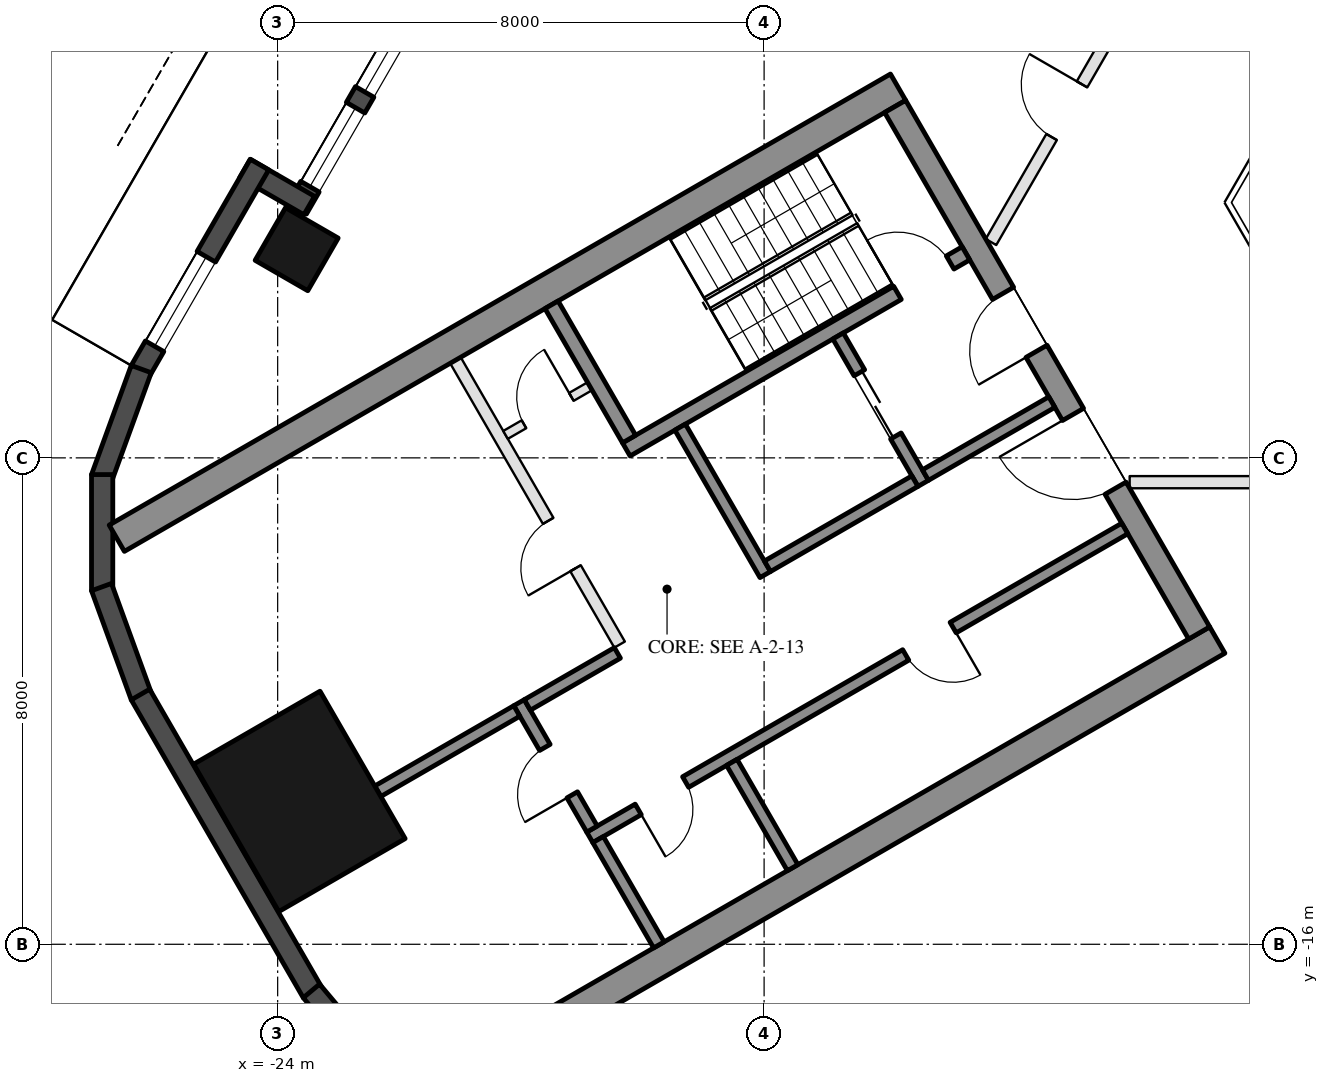
"""IFC4 building model, lengths in metres.
Left out: names, types, materials, properties, quantities, classifications, styles, units other than length and angle.
Written with IfcOpenShell. Run it as: python <this file> out.ifc"""

import sys

from ifc_helpers import new_model, si_unit, direction, frame, frame_2d, origin, origin_2d, place, context, subcontext, project, spatial, rectangle, hollow_rectangle, extrude, element, fill, save


model = new_model("IFC4")
c1 = context("Model", 3, precision=1e-05, world=origin(), true_north=direction((0.0, 1.0)))
c2 = subcontext(c1, "Body", "Model", "MODEL_VIEW")
j1 = project(units=[si_unit("LENGTHUNIT", "METRE"), si_unit("PLANEANGLEUNIT", "RADIAN")], contexts=[c1])
p1 = place(None, origin())
s1 = spatial("IfcSite", under=j1, at=p1, CompositionType="ELEMENT")
p2 = place(p1, origin())
s2 = spatial("IfcBuilding", under=s1, at=p2, CompositionType="ELEMENT")
p3 = place(p2, frame((0.0, 0.0, 65.0)))
s3 = spatial("IfcBuildingStorey", under=s2, at=p3, CompositionType="ELEMENT", Elevation=65.0)
p4 = place(p3, frame((-23.688, -4.568, 0.0), z_axis=(0.0, 0.0, 1.0), x_axis=(0.5, 0.866025403784, 0.0)))
e1 = element("IfcColumn", 1, at=p4, inside=s3, PredefinedType="COLUMN", context=c2, shape_type="SweptSolid", body=[
    extrude(hollow_rectangle(XDim=1.0, YDim=1.0, WallThickness=0.045, at=origin_2d()), origin(), (0.0, 0.0, 1.0), 3.7),
])
p5 = place(p3, frame((-23.643, -13.65, 0.0), z_axis=(0.0, 0.0, 1.0), x_axis=(-0.5, 0.866025403784, 0.0)))
e2 = element("IfcColumn", 2, at=p5, inside=s3, PredefinedType="COLUMN", context=c2, shape_type="SweptSolid", body=[
    extrude(hollow_rectangle(XDim=2.8, YDim=2.4, WallThickness=0.07, at=origin_2d()), origin(), (0.0, 0.0, 1.0), 3.7),
])
p6 = place(p3, frame((-20.309, 1.934, 0.0), z_axis=(0.0, 0.0, 1.0), x_axis=(-0.499992114976, -0.866029956157, 0.0)))
e3 = element("IfcWall", 3, at=p6, inside=s3, PredefinedType="SOLIDWALL", context=c2, shape_type="SweptSolid", body=[
    extrude(rectangle(XDim=6.74, YDim=0.35, at=frame_2d((3.37, 0.0))), origin(), (0.0, 0.0, 1.0), 3.55),
])
p7 = place(p6, frame((0.32, 0.0, 0.0)))
e4 = element("IfcOpeningElement", 4, at=p7, cuts=e3, PredefinedType="OPENING", context=c2, shape_type="SweptSolid", body=[
    extrude(rectangle(XDim=2.4, YDim=2.4, at=frame_2d((1.2, 1.2))), frame((0.0, 0.185, 0.0), z_axis=(0.0, -1.0, 0.0), x_axis=(1.0, 0.0, 0.0)), (0.0, 0.0, 1.0), 0.37),
])
p8 = place(p6, frame((3.02, 0.0, 0.3)))
e5 = element("IfcOpeningElement", 5, at=p8, cuts=e3, PredefinedType="OPENING", context=c2, shape_type="SweptSolid", body=[
    extrude(rectangle(XDim=1.5, YDim=2.65, at=frame_2d((0.75, 1.325))), frame((0.0, 0.185, 0.0), z_axis=(0.0, -1.0, 0.0), x_axis=(1.0, 0.0, 0.0)), (0.0, 0.0, 1.0), 0.37),
])
p9 = place(p6, frame((4.82, 0.0, 0.3)))
e6 = element("IfcOpeningElement", 6, at=p9, cuts=e3, PredefinedType="OPENING", context=c2, shape_type="SweptSolid", body=[
    extrude(rectangle(XDim=1.5, YDim=2.65, at=frame_2d((0.75, 1.325))), frame((0.0, 0.185, 0.0), z_axis=(0.0, -1.0, 0.0), x_axis=(1.0, 0.0, 0.0)), (0.0, 0.0, 1.0), 0.37),
])
p10 = place(p3, frame((-23.481, -3.85, 0.0), z_axis=(0.0, 0.0, 1.0), x_axis=(-0.866092288191, 0.499884134912, 0.0)))
e7 = element("IfcWall", 7, at=p10, inside=s3, PredefinedType="SOLIDWALL", context=c2, shape_type="SweptSolid", body=[
    extrude(rectangle(XDim=1.22, YDim=0.35, at=frame_2d((0.61, 0.0))), origin(), (0.0, 0.0, 1.0), 3.55),
])
p11 = place(p3, frame((-24.299, -3.176, 0.0), z_axis=(0.0, 0.0, 1.0), x_axis=(-0.500028278809, -0.866009076391, 0.0)))
e8 = element("IfcWall", 8, at=p11, inside=s3, PredefinedType="SOLIDWALL", context=c2, shape_type="SweptSolid", body=[
    extrude(rectangle(XDim=3.916, YDim=0.35, at=frame_2d((1.958, 0.0))), origin(), (0.0, 0.0, 1.0), 3.55),
])
p12 = place(p11, frame((1.75, 0.0, 0.3)))
e9 = element("IfcOpeningElement", 9, at=p12, cuts=e8, PredefinedType="OPENING", context=c2, shape_type="SweptSolid", body=[
    extrude(rectangle(XDim=1.7, YDim=2.65, at=frame_2d((0.85, 1.325))), frame((0.0, 0.185, 0.0), z_axis=(0.0, -1.0, 0.0), x_axis=(1.0, 0.0, 0.0)), (0.0, 0.0, 1.0), 0.37),
])
for number, where, z_axis, x_axis in (
    (10, (-26.244, -6.54, 0.0), (0.0, 0.0, 1.0), (-0.342, -0.94, 0.0)),
    (11, (-26.886, -8.275, 0.0), (0.0, 0.0, 1.0), (0.0, -1.0, 0.0)),
    (12, (-26.897, -10.125, 0.0), (0.0, 0.0, 1.0), (0.342, -0.94, 0.0)),
):
    element("IfcWall", number, at=place(p3, frame(where, z_axis=z_axis, x_axis=x_axis)), inside=s3, PredefinedType="SOLIDWALL", context=c2, shape_type="SweptSolid", body=[
        extrude(rectangle(XDim=1.91, YDim=0.35, at=frame_2d((0.955, 0.0))), origin(), (0.0, 0.0, 1.0), 3.55),
    ])
p13 = place(p3, frame((-26.257, -11.893, 0.0), z_axis=(0.0, 0.0, 1.0), x_axis=(0.500018773155, -0.866014564827, 0.0)))
e13 = element("IfcWall", 13, at=p13, inside=s3, PredefinedType="SOLIDWALL", context=c2, shape_type="SweptSolid", body=[
    extrude(rectangle(XDim=5.658, YDim=0.35, at=frame_2d((2.829, 0.0))), origin(), (0.0, 0.0, 1.0), 3.55),
])
p14 = place(p3, frame((-23.445, -16.768, 0.0), z_axis=(0.0, 0.0, 1.0), x_axis=(0.642733291068, -0.76609001857, 0.0)))
e14 = element("IfcWall", 14, at=p14, inside=s3, PredefinedType="SOLIDWALL", context=c2, shape_type="SweptSolid", body=[
    extrude(rectangle(XDim=1.91, YDim=0.35, at=frame_2d((0.955, 0.0))), origin(), (0.0, 0.0, 1.0), 3.55),
])
for number, where, z_axis, x_axis in (
    (15, (-13.797, -1.903, 0.0), (0.0, 0.0, 1.0), (-0.866, -0.5, 0.0)),
    (16, (-8.547, -10.997, 0.0), (0.0, 0.0, 1.0), (-0.866, -0.5, 0.0)),
):
    element("IfcWall", number, at=place(p3, frame(where, z_axis=z_axis, x_axis=x_axis)), inside=s3, PredefinedType="SHEAR", context=c2, shape_type="SweptSolid", body=[
        extrude(rectangle(XDim=14.837, YDim=0.5, at=frame_2d((7.418, 0.0))), origin(), (0.0, 0.0, 1.0), 3.5),
    ])
p15 = place(p3, frame((-13.845, -2.22, 0.0), z_axis=(0.0, 0.0, 1.0), x_axis=(0.500004234368, -0.866022959057, 0.0)))
e17 = element("IfcWall", 17, at=p15, inside=s3, PredefinedType="SHEAR", context=c2, shape_type="SweptSolid", body=[
    extrude(rectangle(XDim=10.0, YDim=0.4, at=frame_2d((5.0, 0.0))), origin(), (0.0, 0.0, 1.0), 3.5),
])
p16 = place(p15, frame((3.55, 0.0, 0.0)))
e18 = element("IfcOpeningElement", 18, at=p16, cuts=e17, PredefinedType="OPENING", context=c2, shape_type="SweptSolid", body=[
    extrude(rectangle(XDim=1.1, YDim=2.1, at=frame_2d((0.55, 1.05))), frame((0.0, 0.21, 0.0), z_axis=(0.0, -1.0, 0.0), x_axis=(1.0, 0.0, 0.0)), (0.0, 0.0, 1.0), 0.42),
])
p17 = place(p15, frame((5.85, 0.0, 0.0)))
e19 = element("IfcOpeningElement", 19, at=p17, cuts=e17, PredefinedType="OPENING", context=c2, shape_type="SweptSolid", body=[
    extrude(rectangle(XDim=1.4, YDim=2.1, at=frame_2d((0.7, 1.05))), frame((0.0, 0.21, 0.0), z_axis=(0.0, -1.0, 0.0), x_axis=(1.0, 0.0, 0.0)), (0.0, 0.0, 1.0), 0.42),
])
p18 = place(p3, frame((-12.681, -4.636, 0.0), z_axis=(0.0, 0.0, 1.0), x_axis=(-0.866021702275, -0.500006411147, 0.0)))
e20 = element("IfcWall", 20, at=p18, inside=s3, PredefinedType="SHEAR", context=c2, shape_type="SweptSolid", body=[
    extrude(rectangle(XDim=6.45, YDim=0.25, at=frame_2d((3.225, 0.0))), origin(), (0.0, 0.0, 1.0), 3.5),
])
p19 = place(p18, frame((0.3, 0.0, 0.0)))
e21 = element("IfcOpeningElement", 21, at=p19, cuts=e20, PredefinedType="OPENING", context=c2, shape_type="SweptSolid", body=[
    extrude(rectangle(XDim=1.0, YDim=2.1, at=frame_2d((0.5, 1.05))), frame((0.0, 0.135, 0.0), z_axis=(0.0, -1.0, 0.0), x_axis=(1.0, 0.0, 0.0)), (0.0, 0.0, 1.0), 0.27),
])
p20 = place(p3, frame((-19.496, -5.482, 0.0), z_axis=(0.0, 0.0, 1.0), x_axis=(0.499990435942, -0.866030925526, 0.0)))
e22 = element("IfcWall", 22, at=p20, inside=s3, PredefinedType="SHEAR", context=c2, shape_type="SweptSolid", body=[
    extrude(rectangle(XDim=2.55, YDim=0.25, at=frame_2d((1.275, 0.0))), origin(), (0.0, 0.0, 1.0), 3.5),
])
p21 = place(p3, frame((-17.381, -7.495, 0.0), z_axis=(0.0, 0.0, 1.0), x_axis=(0.500011755427, -0.866018616679, 0.0)))
e23 = element("IfcWall", 23, at=p21, inside=s3, PredefinedType="SHEAR", context=c2, shape_type="SweptSolid", body=[
    extrude(rectangle(XDim=2.8, YDim=0.2, at=frame_2d((1.4, 0.0))), origin(), (0.0, 0.0, 1.0), 3.5),
])
p22 = place(p3, frame((-14.783, -5.995, 0.0), z_axis=(0.0, 0.0, 1.0), x_axis=(0.49994636267, -0.866056369097, 0.0)))
e24 = element("IfcWall", 24, at=p22, inside=s3, PredefinedType="SHEAR", context=c2, shape_type="SweptSolid", body=[
    extrude(rectangle(XDim=2.8, YDim=0.2, at=frame_2d((1.4, 0.0))), origin(), (0.0, 0.0, 1.0), 3.5),
])
p23 = place(p22, frame((0.7, 0.0, 0.0)))
e25 = element("IfcOpeningElement", 25, at=p23, cuts=e24, PredefinedType="OPENING", context=c2, shape_type="SweptSolid", body=[
    extrude(rectangle(XDim=1.2, YDim=2.1, at=frame_2d((0.6, 1.05))), frame((0.0, 0.11, 0.0), z_axis=(0.0, -1.0, 0.0), x_axis=(1.0, 0.0, 0.0)), (0.0, 0.0, 1.0), 0.22),
])
p24 = place(p3, frame((-13.52, -8.383, 0.0), z_axis=(0.0, 0.0, 1.0), x_axis=(-0.866034573852, -0.49998411664, 0.0)))
e26 = element("IfcWall", 26, at=p24, inside=s3, PredefinedType="SHEAR", context=c2, shape_type="SweptSolid", body=[
    extrude(rectangle(XDim=2.8, YDim=0.2, at=frame_2d((1.4, 0.0))), origin(), (0.0, 0.0, 1.0), 3.5),
])
p25 = place(p3, frame((-11.268, -7.083, 0.0), z_axis=(0.0, 0.0, 1.0), x_axis=(-0.866050077142, -0.499957262057, 0.0)))
e27 = element("IfcWall", 27, at=p25, inside=s3, PredefinedType="SHEAR", context=c2, shape_type="SweptSolid", body=[
    extrude(rectangle(XDim=2.4, YDim=0.2, at=frame_2d((1.2, 0.0))), origin(), (0.0, 0.0, 1.0), 3.5),
])
p26 = place(p3, frame((-10.068, -9.162, 0.0), z_axis=(0.0, 0.0, 1.0), x_axis=(-0.866032725843, -0.499987317609, 0.0)))
e28 = element("IfcWall", 28, at=p26, inside=s3, PredefinedType="SHEAR", context=c2, shape_type="SweptSolid", body=[
    extrude(rectangle(XDim=10.16, YDim=0.2, at=frame_2d((5.08, 0.0))), origin(), (0.0, 0.0, 1.0), 3.5),
])
p27 = place(p26, frame((3.26, 0.0, 0.0)))
e29 = element("IfcOpeningElement", 29, at=p27, cuts=e28, PredefinedType="OPENING", context=c2, shape_type="SweptSolid", body=[
    extrude(rectangle(XDim=0.9, YDim=2.1, at=frame_2d((0.45, 1.05))), frame((0.0, 0.11, 0.0), z_axis=(0.0, -1.0, 0.0), x_axis=(1.0, 0.0, 0.0)), (0.0, 0.0, 1.0), 0.22),
])
p28 = place(p26, frame((8.34, 0.0, 0.0)))
e30 = element("IfcOpeningElement", 30, at=p28, cuts=e28, PredefinedType="OPENING", context=c2, shape_type="SweptSolid", body=[
    extrude(rectangle(XDim=0.9, YDim=2.1, at=frame_2d((0.45, 1.05))), frame((0.0, 0.11, 0.0), z_axis=(0.0, -1.0, 0.0), x_axis=(1.0, 0.0, 0.0)), (0.0, 0.0, 1.0), 0.22),
])
p29 = place(p3, frame((-20.031, -12.026, 0.0), z_axis=(0.0, 0.0, 1.0), x_axis=(0.500033551112, -0.866006032174, 0.0)))
e31 = element("IfcWall", 31, at=p29, inside=s3, PredefinedType="SHEAR", context=c2, shape_type="SweptSolid", body=[
    extrude(rectangle(XDim=2.4, YDim=0.2, at=frame_2d((1.2, 0.0))), origin(), (0.0, 0.0, 1.0), 3.5),
])
p30 = place(p29, frame((0.85, 0.0, 0.0)))
e32 = element("IfcOpeningElement", 32, at=p30, cuts=e31, PredefinedType="OPENING", context=c2, shape_type="SweptSolid", body=[
    extrude(rectangle(XDim=0.9, YDim=2.1, at=frame_2d((0.45, 1.05))), frame((0.0, 0.11, 0.0), z_axis=(0.0, -1.0, 0.0), x_axis=(1.0, 0.0, 0.0)), (0.0, 0.0, 1.0), 0.22),
])
p31 = place(p3, frame((-18.413, -11.208, 0.0), z_axis=(0.0, 0.0, 1.0), x_axis=(-0.866038183914, -0.499977863513, 0.0)))
e33 = element("IfcWall", 33, at=p31, inside=s3, PredefinedType="SHEAR", context=c2, shape_type="SweptSolid", body=[
    extrude(rectangle(XDim=1.71, YDim=0.2, at=frame_2d((0.855, 0.0))), origin(), (0.0, 0.0, 1.0), 3.5),
])
for number, where, z_axis, x_axis in (
    (34, (-16.531, -13.008, 0.0), (0.0, 0.0, 1.0), (0.5, -0.866, 0.0)),
    (35, (-18.73, -14.278, 0.0), (0.0, 0.0, 1.0), (0.5, -0.866, 0.0)),
):
    element("IfcWall", number, at=place(p3, frame(where, z_axis=z_axis, x_axis=x_axis)), inside=s3, PredefinedType="SHEAR", context=c2, shape_type="SweptSolid", body=[
        extrude(rectangle(XDim=2.0, YDim=0.2, at=frame_2d((1.0, 0.0))), origin(), (0.0, 0.0, 1.0), 3.5),
    ])
p32 = place(p3, frame((-20.067, -12.163, 0.0), z_axis=(0.0, 0.0, 1.0), x_axis=(-0.866060851709, -0.499938597367, 0.0)))
e36 = element("IfcWall", 36, at=p32, inside=s3, PredefinedType="SHEAR", context=c2, shape_type="SweptSolid", body=[
    extrude(rectangle(XDim=2.64, YDim=0.2, at=frame_2d((1.32, 0.0))), origin(), (0.0, 0.0, 1.0), 3.5),
])
p33 = place(p3, frame((-21.076, -6.395, 0.0), z_axis=(0.0, 0.0, 1.0), x_axis=(0.50001468107, -0.866016927499, 0.0)))
e37 = element("IfcWall", 37, at=p33, inside=s3, PredefinedType="PARTITIONING", context=c2, shape_type="SweptSolid", body=[
    extrude(rectangle(XDim=5.4, YDim=0.2, at=frame_2d((2.7, 0.0))), origin(), (0.0, 0.0, 1.0), 3.5),
])
p34 = place(p33, frame((3.05, 0.0, 0.0)))
e38 = element("IfcOpeningElement", 38, at=p34, cuts=e37, PredefinedType="OPENING", context=c2, shape_type="SweptSolid", body=[
    extrude(rectangle(XDim=0.9, YDim=2.1, at=frame_2d((0.45, 1.05))), frame((0.0, 0.11, 0.0), z_axis=(0.0, -1.0, 0.0), x_axis=(1.0, 0.0, 0.0)), (0.0, 0.0, 1.0), 0.22),
])
p35 = place(p3, frame((-18.866, -6.822, 0.0), z_axis=(0.0, 0.0, 1.0), x_axis=(-0.866028054938, -0.499995408039, 0.0)))
e39 = element("IfcWall", 39, at=p35, inside=s3, PredefinedType="PARTITIONING", context=c2, shape_type="SweptSolid", body=[
    extrude(rectangle(XDim=1.6, YDim=0.15, at=frame_2d((0.8, 0.0))), origin(), (0.0, 0.0, 1.0), 3.5),
])
p36 = place(p35, frame((0.35, 0.0, 0.0)))
e40 = element("IfcOpeningElement", 40, at=p36, cuts=e39, PredefinedType="OPENING", context=c2, shape_type="SweptSolid", body=[
    extrude(rectangle(XDim=0.9, YDim=2.1, at=frame_2d((0.45, 1.05))), frame((0.0, 0.085, 0.0), z_axis=(0.0, -1.0, 0.0), x_axis=(1.0, 0.0, 0.0)), (0.0, 0.0, 1.0), 0.17),
])
p37 = place(p3, frame((-0.1, -8.4, 0.0), z_axis=(0.0, 0.0, 1.0), x_axis=(-1.0, 0.0, 0.0)))
e41 = element("IfcWall", 41, at=p37, inside=s3, PredefinedType="PARTITIONING", context=c2, shape_type="SweptSolid", body=[
    extrude(rectangle(XDim=9.888, YDim=0.2, at=frame_2d((4.944, 0.0))), origin(), (0.0, 0.0, 1.0), 2.95),
])
p38 = place(p37, frame((4.444, 0.0, 0.0)))
e42 = element("IfcOpeningElement", 42, at=p38, cuts=e41, PredefinedType="OPENING", context=c2, shape_type="SweptSolid", body=[
    extrude(rectangle(XDim=1.0, YDim=2.1, at=frame_2d((0.5, 1.05))), frame((0.0, 0.11, 0.0), z_axis=(0.0, -1.0, 0.0), x_axis=(1.0, 0.0, 0.0)), (0.0, 0.0, 1.0), 0.22),
])
p39 = place(p3, frame((-12.269, -4.45, 0.0), z_axis=(0.0, 0.0, 1.0), x_axis=(0.500013374061, 0.866017682129, 0.0)))
e43 = element("IfcWall", 43, at=p39, inside=s3, PredefinedType="PARTITIONING", context=c2, shape_type="SweptSolid", body=[
    extrude(rectangle(XDim=4.988, YDim=0.2, at=frame_2d((2.494, 0.0))), origin(), (0.0, 0.0, 1.0), 2.95),
])
p40 = place(p39, frame((1.994, 0.0, 0.0)))
e44 = element("IfcOpeningElement", 44, at=p40, cuts=e43, PredefinedType="OPENING", context=c2, shape_type="SweptSolid", body=[
    extrude(rectangle(XDim=1.0, YDim=2.1, at=frame_2d((0.5, 1.05))), frame((0.0, 0.11, 0.0), z_axis=(0.0, -1.0, 0.0), x_axis=(1.0, 0.0, 0.0)), (0.0, 0.0, 1.0), 0.22),
])
p41 = place(p8, origin())
e45 = element("IfcWindow", 45, at=p41, inside=s3, PartitioningType="SINGLE_PANEL", PredefinedType="WINDOW", context=c2, shape_type="SweptSolid", body=[
    extrude(rectangle(XDim=1.5, YDim=2.65, at=frame_2d((0.75, 1.325))), frame((0.0, 0.03, 0.0), z_axis=(0.0, -1.0, 0.0), x_axis=(1.0, 0.0, 0.0)), (0.0, 0.0, 1.0), 0.06),
])
fill(e5, e45)
p42 = place(p9, origin())
e46 = element("IfcWindow", 46, at=p42, inside=s3, PartitioningType="SINGLE_PANEL", PredefinedType="WINDOW", context=c2, shape_type="SweptSolid", body=[
    extrude(rectangle(XDim=1.5, YDim=2.65, at=frame_2d((0.75, 1.325))), frame((0.0, 0.03, 0.0), z_axis=(0.0, -1.0, 0.0), x_axis=(1.0, 0.0, 0.0)), (0.0, 0.0, 1.0), 0.06),
])
fill(e6, e46)
p43 = place(p12, origin())
e47 = element("IfcWindow", 47, at=p43, inside=s3, PartitioningType="SINGLE_PANEL", PredefinedType="WINDOW", context=c2, shape_type="SweptSolid", body=[
    extrude(rectangle(XDim=1.7, YDim=2.65, at=frame_2d((0.85, 1.325))), frame((0.0, 0.03, 0.0), z_axis=(0.0, -1.0, 0.0), x_axis=(1.0, 0.0, 0.0)), (0.0, 0.0, 1.0), 0.06),
])
fill(e9, e47)
p44 = place(p23, origin())
e48 = element("IfcDoor", 48, at=p44, inside=s3, OperationType="DOUBLE_DOOR_SLIDING", PredefinedType="DOOR", context=c2, shape_type="SweptSolid", body=[
    extrude(rectangle(XDim=1.2, YDim=2.1, at=frame_2d((0.6, 1.05))), frame((0.0, 0.025, 0.0), z_axis=(0.0, -1.0, 0.0), x_axis=(1.0, 0.0, 0.0)), (0.0, 0.0, 1.0), 0.05),
])
fill(e25, e48)
p45 = place(p36, frame((0.9, 0.0, 0.0), z_axis=(0.0, 0.0, 1.0), x_axis=(-1.0, 0.0, 0.0)))
e49 = element("IfcDoor", 49, at=p45, inside=s3, OperationType="SINGLE_SWING_RIGHT", PredefinedType="DOOR", context=c2, shape_type="SweptSolid", body=[
    extrude(rectangle(XDim=0.9, YDim=2.1, at=frame_2d((0.45, 1.05))), frame((0.0, 0.025, 0.0), z_axis=(0.0, -1.0, 0.0), x_axis=(1.0, 0.0, 0.0)), (0.0, 0.0, 1.0), 0.05),
])
fill(e40, e49)
p46 = place(p27, origin())
e50 = element("IfcDoor", 50, at=p46, inside=s3, OperationType="SINGLE_SWING_LEFT", PredefinedType="DOOR", context=c2, shape_type="SweptSolid", body=[
    extrude(rectangle(XDim=0.9, YDim=2.1, at=frame_2d((0.45, 1.05))), frame((0.0, 0.025, 0.0), z_axis=(0.0, -1.0, 0.0), x_axis=(1.0, 0.0, 0.0)), (0.0, 0.0, 1.0), 0.05),
])
fill(e29, e50)
p47 = place(p28, origin())
e51 = element("IfcDoor", 51, at=p47, inside=s3, OperationType="SINGLE_SWING_RIGHT", PredefinedType="DOOR", context=c2, shape_type="SweptSolid", body=[
    extrude(rectangle(XDim=0.9, YDim=2.1, at=frame_2d((0.45, 1.05))), frame((0.0, 0.025, 0.0), z_axis=(0.0, -1.0, 0.0), x_axis=(1.0, 0.0, 0.0)), (0.0, 0.0, 1.0), 0.05),
])
fill(e30, e51)
p48 = place(p30, frame((0.9, 0.0, 0.0), z_axis=(0.0, 0.0, 1.0), x_axis=(-1.0, 0.0, 0.0)))
e52 = element("IfcDoor", 52, at=p48, inside=s3, OperationType="SINGLE_SWING_LEFT", PredefinedType="DOOR", context=c2, shape_type="SweptSolid", body=[
    extrude(rectangle(XDim=0.9, YDim=2.1, at=frame_2d((0.45, 1.05))), frame((0.0, 0.025, 0.0), z_axis=(0.0, -1.0, 0.0), x_axis=(1.0, 0.0, 0.0)), (0.0, 0.0, 1.0), 0.05),
])
fill(e32, e52)
p49 = place(p34, frame((0.9, 0.0, 0.0), z_axis=(0.0, 0.0, 1.0), x_axis=(-1.0, 0.0, 0.0)))
e53 = element("IfcDoor", 53, at=p49, inside=s3, OperationType="SINGLE_SWING_LEFT", PredefinedType="DOOR", context=c2, shape_type="SweptSolid", body=[
    extrude(rectangle(XDim=0.9, YDim=2.1, at=frame_2d((0.45, 1.05))), frame((0.0, 0.025, 0.0), z_axis=(0.0, -1.0, 0.0), x_axis=(1.0, 0.0, 0.0)), (0.0, 0.0, 1.0), 0.05),
])
fill(e38, e53)
p50 = place(p16, frame((1.1, 0.0, 0.0), z_axis=(0.0, 0.0, 1.0), x_axis=(-1.0, 0.0, 0.0)))
e54 = element("IfcDoor", 54, at=p50, inside=s3, OperationType="SINGLE_SWING_LEFT", PredefinedType="DOOR", context=c2, shape_type="SweptSolid", body=[
    extrude(rectangle(XDim=1.1, YDim=2.1, at=frame_2d((0.55, 1.05))), frame((0.0, 0.025, 0.0), z_axis=(0.0, -1.0, 0.0), x_axis=(1.0, 0.0, 0.0)), (0.0, 0.0, 1.0), 0.05),
])
fill(e18, e54)
p51 = place(p17, frame((1.4, 0.0, 0.0), z_axis=(0.0, 0.0, 1.0), x_axis=(-1.0, 0.0, 0.0)))
e55 = element("IfcDoor", 55, at=p51, inside=s3, OperationType="DOUBLE_DOOR_SINGLE_SWING", PredefinedType="DOOR", context=c2, shape_type="SweptSolid", body=[
    extrude(rectangle(XDim=1.4, YDim=2.1, at=frame_2d((0.7, 1.05))), frame((0.0, 0.025, 0.0), z_axis=(0.0, -1.0, 0.0), x_axis=(1.0, 0.0, 0.0)), (0.0, 0.0, 1.0), 0.05),
])
fill(e19, e55)
p52 = place(p19, frame((1.0, 0.0, 0.0), z_axis=(0.0, 0.0, 1.0), x_axis=(-1.0, 0.0, 0.0)))
e56 = element("IfcDoor", 56, at=p52, inside=s3, OperationType="SINGLE_SWING_LEFT", PredefinedType="DOOR", context=c2, shape_type="SweptSolid", body=[
    extrude(rectangle(XDim=1.0, YDim=2.1, at=frame_2d((0.5, 1.05))), frame((0.0, 0.025, 0.0), z_axis=(0.0, -1.0, 0.0), x_axis=(1.0, 0.0, 0.0)), (0.0, 0.0, 1.0), 0.05),
])
fill(e21, e56)
p53 = place(p40, origin())
e57 = element("IfcDoor", 57, at=p53, inside=s3, OperationType="SINGLE_SWING_RIGHT", PredefinedType="DOOR", context=c2, shape_type="SweptSolid", body=[
    extrude(rectangle(XDim=1.0, YDim=2.1, at=frame_2d((0.5, 1.05))), frame((0.0, 0.025, 0.0), z_axis=(0.0, -1.0, 0.0), x_axis=(1.0, 0.0, 0.0)), (0.0, 0.0, 1.0), 0.05),
])
fill(e44, e57)
save(model, sys.argv[1])
